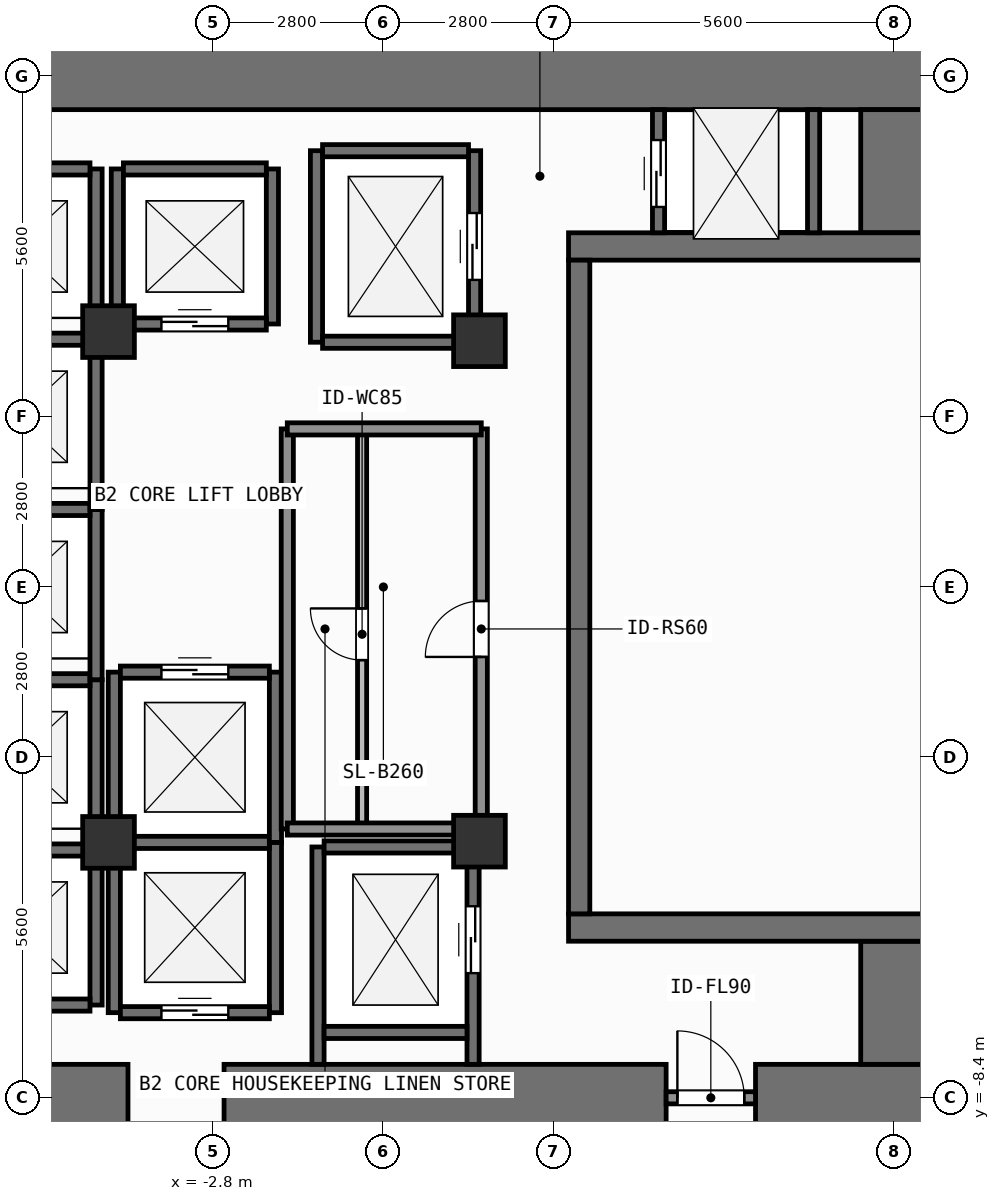
"""IFC4 building model, lengths in metres.
Left out: names, types, materials, properties, quantities, classifications, styles, units other than length and angle.
Written with IfcOpenShell. Run it as: python <this file> out.ifc"""

import sys

from ifc_helpers import new_model, si_unit, direction, frame, frame_2d, origin, origin_2d, place, context, subcontext, project, spatial, rectangle, extrude, element, fill, save


model = new_model("IFC4")
c1 = context("Model", 3, precision=1e-05, world=origin(), true_north=direction((0.0, 1.0)))
c2 = subcontext(c1, "Body", "Model", "MODEL_VIEW")
j1 = project(units=[si_unit("LENGTHUNIT", "METRE"), si_unit("PLANEANGLEUNIT", "RADIAN")], contexts=[c1])
p1 = place(None, origin())
s1 = spatial("IfcSite", under=j1, at=p1, CompositionType="ELEMENT")
p2 = place(p1, origin())
s2 = spatial("IfcBuilding", under=s1, at=p2, CompositionType="ELEMENT")
p3 = place(p2, frame((0.0, 0.0, -8.4)))
s3 = spatial("IfcBuildingStorey", under=s2, at=p3, CompositionType="ELEMENT", Elevation=-8.4)
p4 = place(p3, frame((-7.55, -8.4, 0.0), z_axis=(0.0, 0.0, 1.0), x_axis=(1.0, 0.0, 0.0)))
e1 = element("IfcWall", 1, at=p4, inside=s3, PredefinedType="SHEAR", context=c2, shape_type="SweptSolid", body=[
    extrude(rectangle(XDim=3.35, YDim=1.1, at=frame_2d((1.675, 0.0))), origin(), (0.0, 0.0, 1.0), 4.2),
])
p5 = place(p3, frame((-2.62, -8.4, 0.0), z_axis=(0.0, 0.0, 1.0), x_axis=(1.0, 0.0, 0.0)))
e2 = element("IfcWall", 2, at=p5, inside=s3, PredefinedType="SHEAR", context=c2, shape_type="SweptSolid", body=[
    extrude(rectangle(XDim=7.27, YDim=1.1, at=frame_2d((3.635, 0.0))), origin(), (0.0, 0.0, 1.0), 4.2),
])
p6 = place(p3, frame((6.12, -8.4, 0.0), z_axis=(0.0, 0.0, 1.0), x_axis=(1.0, 0.0, 0.0)))
e3 = element("IfcWall", 3, at=p6, inside=s3, PredefinedType="SHEAR", context=c2, shape_type="SweptSolid", body=[
    extrude(rectangle(XDim=2.83, YDim=1.1, at=frame_2d((1.415, 0.0))), origin(), (0.0, 0.0, 1.0), 4.2),
])
p7 = place(p3, frame((-7.55, 8.4, 0.0), z_axis=(0.0, 0.0, 1.0), x_axis=(1.0, 0.0, 0.0)))
e4 = element("IfcWall", 4, at=p7, inside=s3, PredefinedType="SHEAR", context=c2, shape_type="SweptSolid", body=[
    extrude(rectangle(XDim=16.5, YDim=1.1, at=frame_2d((8.25, 0.0))), origin(), (0.0, 0.0, 1.0), 4.2),
])
for number, where, z_axis, x_axis in (
    (5, (8.4, -7.85, 0.0), (0.0, 0.0, 1.0), (0.0, 1.0, 0.0)),
    (6, (8.4, 5.825, 0.0), (0.0, 0.0, 1.0), (0.0, 1.0, 0.0)),
):
    element("IfcWall", number, at=place(p3, frame(where, z_axis=z_axis, x_axis=x_axis)), inside=s3, PredefinedType="SHEAR", context=c2, shape_type="SweptSolid", body=[
        extrude(rectangle(XDim=2.025, YDim=1.1, at=frame_2d((1.013, 0.0))), origin(), (0.0, 0.0, 1.0), 4.2),
    ])
for number, where, z_axis, x_axis in (
    (7, (3.045, -5.6, 0.0), (0.0, 0.0, 1.0), (1.0, 0.0, 0.0)),
    (8, (3.045, 5.6, 0.0), (0.0, 0.0, 1.0), (1.0, 0.0, 0.0)),
):
    element("IfcWall", number, at=place(p3, frame(where, z_axis=z_axis, x_axis=x_axis)), inside=s3, PredefinedType="SHEAR", context=c2, shape_type="SweptSolid", body=[
        extrude(rectangle(XDim=5.905, YDim=0.45, at=frame_2d((2.953, 0.0))), origin(), (0.0, 0.0, 1.0), 4.2),
    ])
p8 = place(p3, frame((3.22, -5.375, 0.0), z_axis=(0.0, 0.0, 1.0), x_axis=(0.0, 1.0, 0.0)))
e9 = element("IfcWall", 9, at=p8, inside=s3, PredefinedType="SHEAR", context=c2, shape_type="SweptSolid", body=[
    extrude(rectangle(XDim=10.75, YDim=0.35, at=frame_2d((5.375, 0.0))), origin(), (0.0, 0.0, 1.0), 4.2),
])
for number, where, z_axis, x_axis in (
    (10, (-4.52, -4.2, 0.0), (0.0, 0.0, 1.0), (1.0, 0.0, 0.0)),
    (11, (1.58, -4.18, 0.0), (0.0, 0.0, 1.0), (1.0, 0.0, 0.0)),
    (12, (1.58, 4.05, 0.0), (0.0, 0.0, 1.0), (1.0, 0.0, 0.0)),
    (13, (-4.52, 4.2, 0.0), (0.0, 0.0, 1.0), (1.0, 0.0, 0.0)),
):
    element("IfcColumn", number, at=place(p3, frame(where, z_axis=z_axis, x_axis=x_axis)), inside=s3, PredefinedType="COLUMN", context=c2, shape_type="SweptSolid", body=[
        extrude(rectangle(XDim=0.85, YDim=0.85, at=origin_2d()), origin(), (0.0, 0.0, 1.0), 4.2),
    ])
p9 = place(p3, frame((-4.725, -6.875, 0.0), z_axis=(0.0, 0.0, 1.0), x_axis=(0.0, 1.0, 0.0)))
e14 = element("IfcWall", 14, at=p9, inside=s3, PredefinedType="SHEAR", context=c2, shape_type="SweptSolid", body=[
    extrude(rectangle(XDim=2.55, YDim=0.2, at=frame_2d((1.275, 0.0))), origin(), (0.0, 0.0, 1.0), 3.94),
])
for number, where, z_axis, x_axis in (
    (15, (-7.175, -6.875, 0.0), (0.0, 0.0, 1.0), (1.0, 0.0, 0.0)),
    (16, (-7.175, -4.325, 0.0), (0.0, 0.0, 1.0), (1.0, 0.0, 0.0)),
):
    element("IfcWall", number, at=place(p3, frame(where, z_axis=z_axis, x_axis=x_axis)), inside=s3, PredefinedType="SHEAR", context=c2, shape_type="SweptSolid", body=[
        extrude(rectangle(XDim=2.35, YDim=0.2, at=frame_2d((1.175, 0.0))), origin(), (0.0, 0.0, 1.0), 3.94),
    ])
p10 = place(p3, frame((-4.725, -4.325, 0.0), z_axis=(0.0, 0.0, 1.0), x_axis=(0.0, 1.0, 0.0)))
e17 = element("IfcWall", 17, at=p10, inside=s3, PredefinedType="SHEAR", context=c2, shape_type="SweptSolid", body=[
    extrude(rectangle(XDim=2.8, YDim=0.2, at=frame_2d((1.4, 0.0))), origin(), (0.0, 0.0, 1.0), 3.94),
])
p11 = place(p3, frame((-7.175, -1.525, 0.0), z_axis=(0.0, 0.0, 1.0), x_axis=(1.0, 0.0, 0.0)))
e18 = element("IfcWall", 18, at=p11, inside=s3, PredefinedType="SHEAR", context=c2, shape_type="SweptSolid", body=[
    extrude(rectangle(XDim=2.35, YDim=0.2, at=frame_2d((1.175, 0.0))), origin(), (0.0, 0.0, 1.0), 3.94),
])
p12 = place(p3, frame((-4.725, -1.525, 0.0), z_axis=(0.0, 0.0, 1.0), x_axis=(0.0, 1.0, 0.0)))
e19 = element("IfcWall", 19, at=p12, inside=s3, PredefinedType="SHEAR", context=c2, shape_type="SweptSolid", body=[
    extrude(rectangle(XDim=2.8, YDim=0.2, at=frame_2d((1.4, 0.0))), origin(), (0.0, 0.0, 1.0), 3.94),
])
p13 = place(p3, frame((-7.175, 1.275, 0.0), z_axis=(0.0, 0.0, 1.0), x_axis=(1.0, 0.0, 0.0)))
e20 = element("IfcWall", 20, at=p13, inside=s3, PredefinedType="SHEAR", context=c2, shape_type="SweptSolid", body=[
    extrude(rectangle(XDim=2.35, YDim=0.2, at=frame_2d((1.175, 0.0))), origin(), (0.0, 0.0, 1.0), 3.94),
])
p14 = place(p3, frame((-4.725, 1.275, 0.0), z_axis=(0.0, 0.0, 1.0), x_axis=(0.0, 1.0, 0.0)))
e21 = element("IfcWall", 21, at=p14, inside=s3, PredefinedType="SHEAR", context=c2, shape_type="SweptSolid", body=[
    extrude(rectangle(XDim=2.8, YDim=0.2, at=frame_2d((1.4, 0.0))), origin(), (0.0, 0.0, 1.0), 3.94),
])
p15 = place(p3, frame((-7.175, 4.075, 0.0), z_axis=(0.0, 0.0, 1.0), x_axis=(1.0, 0.0, 0.0)))
e22 = element("IfcWall", 22, at=p15, inside=s3, PredefinedType="SHEAR", context=c2, shape_type="SweptSolid", body=[
    extrude(rectangle(XDim=2.35, YDim=0.2, at=frame_2d((1.175, 0.0))), origin(), (0.0, 0.0, 1.0), 3.94),
])
p16 = place(p3, frame((-4.725, 4.075, 0.0), z_axis=(0.0, 0.0, 1.0), x_axis=(0.0, 1.0, 0.0)))
e23 = element("IfcWall", 23, at=p16, inside=s3, PredefinedType="SHEAR", context=c2, shape_type="SweptSolid", body=[
    extrude(rectangle(XDim=2.8, YDim=0.2, at=frame_2d((1.4, 0.0))), origin(), (0.0, 0.0, 1.0), 3.94),
])
p17 = place(p3, frame((-7.175, 6.875, 0.0), z_axis=(0.0, 0.0, 1.0), x_axis=(1.0, 0.0, 0.0)))
e24 = element("IfcWall", 24, at=p17, inside=s3, PredefinedType="SHEAR", context=c2, shape_type="SweptSolid", body=[
    extrude(rectangle(XDim=2.35, YDim=0.2, at=frame_2d((1.175, 0.0))), origin(), (0.0, 0.0, 1.0), 3.94),
])
for number, where, z_axis, x_axis in (
    (25, (-4.375, 4.325, 0.0), (0.0, 0.0, 1.0), (0.0, 1.0, 0.0)),
    (26, (-1.825, 4.325, 0.0), (0.0, 0.0, 1.0), (0.0, 1.0, 0.0)),
):
    element("IfcWall", number, at=place(p3, frame(where, z_axis=z_axis, x_axis=x_axis)), inside=s3, PredefinedType="SHEAR", context=c2, shape_type="SweptSolid", body=[
        extrude(rectangle(XDim=2.55, YDim=0.2, at=frame_2d((1.275, 0.0))), origin(), (0.0, 0.0, 1.0), 3.94),
    ])
p18 = place(p3, frame((-4.275, 4.325, 0.0), z_axis=(0.0, 0.0, 1.0), x_axis=(1.0, 0.0, 0.0)))
e27 = element("IfcWall", 27, at=p18, inside=s3, PredefinedType="SHEAR", context=c2, shape_type="SweptSolid", body=[
    extrude(rectangle(XDim=2.35, YDim=0.2, at=frame_2d((1.175, 0.0))), origin(), (0.0, 0.0, 1.0), 3.94),
])
p19 = place(p18, frame((0.625, 0.0, 0.0)))
e28 = element("IfcOpeningElement", 28, at=p19, cuts=e27, PredefinedType="OPENING", context=c2, shape_type="SweptSolid", body=[
    extrude(rectangle(XDim=1.1, YDim=2.2, at=frame_2d((0.55, 1.1))), frame((0.0, 0.11, 0.0), z_axis=(0.0, -1.0, 0.0), x_axis=(1.0, 0.0, 0.0)), (0.0, 0.0, 1.0), 0.22),
])
p20 = place(p3, frame((-4.275, 6.875, 0.0), z_axis=(0.0, 0.0, 1.0), x_axis=(1.0, 0.0, 0.0)))
e29 = element("IfcWall", 29, at=p20, inside=s3, PredefinedType="SHEAR", context=c2, shape_type="SweptSolid", body=[
    extrude(rectangle(XDim=2.35, YDim=0.2, at=frame_2d((1.175, 0.0))), origin(), (0.0, 0.0, 1.0), 3.94),
])
for number, where, z_axis, x_axis in (
    (30, (-4.425, -7.0, 0.0), (0.0, 0.0, 1.0), (0.0, 1.0, 0.0)),
    (31, (-1.775, -7.0, 0.0), (0.0, 0.0, 1.0), (0.0, 1.0, 0.0)),
):
    element("IfcWall", number, at=place(p3, frame(where, z_axis=z_axis, x_axis=x_axis)), inside=s3, PredefinedType="SHEAR", context=c2, shape_type="SweptSolid", body=[
        extrude(rectangle(XDim=2.8, YDim=0.2, at=frame_2d((1.4, 0.0))), origin(), (0.0, 0.0, 1.0), 3.94),
    ])
p21 = place(p3, frame((-4.325, -7.0, 0.0), z_axis=(0.0, 0.0, 1.0), x_axis=(1.0, 0.0, 0.0)))
e32 = element("IfcWall", 32, at=p21, inside=s3, PredefinedType="SHEAR", context=c2, shape_type="SweptSolid", body=[
    extrude(rectangle(XDim=2.45, YDim=0.2, at=frame_2d((1.225, 0.0))), origin(), (0.0, 0.0, 1.0), 3.94),
])
p22 = place(p21, frame((0.675, 0.0, 0.0)))
e33 = element("IfcOpeningElement", 33, at=p22, cuts=e32, PredefinedType="OPENING", context=c2, shape_type="SweptSolid", body=[
    extrude(rectangle(XDim=1.1, YDim=2.2, at=frame_2d((0.55, 1.1))), frame((0.0, 0.11, 0.0), z_axis=(0.0, -1.0, 0.0), x_axis=(1.0, 0.0, 0.0)), (0.0, 0.0, 1.0), 0.22),
])
p23 = place(p3, frame((-4.325, -4.2, 0.0), z_axis=(0.0, 0.0, 1.0), x_axis=(1.0, 0.0, 0.0)))
e34 = element("IfcWall", 34, at=p23, inside=s3, PredefinedType="SHEAR", context=c2, shape_type="SweptSolid", body=[
    extrude(rectangle(XDim=2.45, YDim=0.2, at=frame_2d((1.225, 0.0))), origin(), (0.0, 0.0, 1.0), 3.94),
])
for number, where, z_axis, x_axis in (
    (35, (-4.425, -4.2, 0.0), (0.0, 0.0, 1.0), (0.0, 1.0, 0.0)),
    (36, (-1.775, -4.2, 0.0), (0.0, 0.0, 1.0), (0.0, 1.0, 0.0)),
):
    element("IfcWall", number, at=place(p3, frame(where, z_axis=z_axis, x_axis=x_axis)), inside=s3, PredefinedType="SHEAR", context=c2, shape_type="SweptSolid", body=[
        extrude(rectangle(XDim=2.8, YDim=0.2, at=frame_2d((1.4, 0.0))), origin(), (0.0, 0.0, 1.0), 3.94),
    ])
p24 = place(p3, frame((-4.325, -1.4, 0.0), z_axis=(0.0, 0.0, 1.0), x_axis=(1.0, 0.0, 0.0)))
e37 = element("IfcWall", 37, at=p24, inside=s3, PredefinedType="SHEAR", context=c2, shape_type="SweptSolid", body=[
    extrude(rectangle(XDim=2.45, YDim=0.2, at=frame_2d((1.225, 0.0))), origin(), (0.0, 0.0, 1.0), 3.94),
])
p25 = place(p24, frame((0.675, 0.0, 0.0)))
e38 = element("IfcOpeningElement", 38, at=p25, cuts=e37, PredefinedType="OPENING", context=c2, shape_type="SweptSolid", body=[
    extrude(rectangle(XDim=1.1, YDim=2.2, at=frame_2d((0.55, 1.1))), frame((0.0, 0.11, 0.0), z_axis=(0.0, -1.0, 0.0), x_axis=(1.0, 0.0, 0.0)), (0.0, 0.0, 1.0), 0.22),
])
p26 = place(p3, frame((-1.1, 4.025, 0.0), z_axis=(0.0, 0.0, 1.0), x_axis=(0.0, 1.0, 0.0)))
e39 = element("IfcWall", 39, at=p26, inside=s3, PredefinedType="SHEAR", context=c2, shape_type="SweptSolid", body=[
    extrude(rectangle(XDim=3.15, YDim=0.2, at=frame_2d((1.575, 0.0))), origin(), (0.0, 0.0, 1.0), 3.94),
])
p27 = place(p3, frame((1.5, 4.025, 0.0), z_axis=(0.0, 0.0, 1.0), x_axis=(0.0, 1.0, 0.0)))
e40 = element("IfcWall", 40, at=p27, inside=s3, PredefinedType="SHEAR", context=c2, shape_type="SweptSolid", body=[
    extrude(rectangle(XDim=3.15, YDim=0.2, at=frame_2d((1.575, 0.0))), origin(), (0.0, 0.0, 1.0), 3.94),
])
p28 = place(p27, frame((1.025, 0.0, 0.0)))
e41 = element("IfcOpeningElement", 41, at=p28, cuts=e40, PredefinedType="OPENING", context=c2, shape_type="SweptSolid", body=[
    extrude(rectangle(XDim=1.1, YDim=2.2, at=frame_2d((0.55, 1.1))), frame((0.0, 0.11, 0.0), z_axis=(0.0, -1.0, 0.0), x_axis=(1.0, 0.0, 0.0)), (0.0, 0.0, 1.0), 0.22),
])
for number, where, z_axis, x_axis in (
    (42, (-1.0, 4.025, 0.0), (0.0, 0.0, 1.0), (1.0, 0.0, 0.0)),
    (43, (-1.0, 7.175, 0.0), (0.0, 0.0, 1.0), (1.0, 0.0, 0.0)),
):
    element("IfcWall", number, at=place(p3, frame(where, z_axis=z_axis, x_axis=x_axis)), inside=s3, PredefinedType="SHEAR", context=c2, shape_type="SweptSolid", body=[
        extrude(rectangle(XDim=2.4, YDim=0.2, at=frame_2d((1.2, 0.0))), origin(), (0.0, 0.0, 1.0), 3.94),
    ])
p29 = place(p3, frame((-1.075, -7.85, 0.0), z_axis=(0.0, 0.0, 1.0), x_axis=(0.0, 1.0, 0.0)))
e44 = element("IfcWall", 44, at=p29, inside=s3, PredefinedType="SHEAR", context=c2, shape_type="SweptSolid", body=[
    extrude(rectangle(XDim=3.575, YDim=0.2, at=frame_2d((1.788, 0.0))), origin(), (0.0, 0.0, 1.0), 3.94),
])
p30 = place(p3, frame((1.475, -7.85, 0.0), z_axis=(0.0, 0.0, 1.0), x_axis=(0.0, 1.0, 0.0)))
e45 = element("IfcWall", 45, at=p30, inside=s3, PredefinedType="SHEAR", context=c2, shape_type="SweptSolid", body=[
    extrude(rectangle(XDim=3.575, YDim=0.2, at=frame_2d((1.788, 0.0))), origin(), (0.0, 0.0, 1.0), 3.94),
])
p31 = place(p30, frame((1.5, 0.0, 0.0)))
e46 = element("IfcOpeningElement", 46, at=p31, cuts=e45, PredefinedType="OPENING", context=c2, shape_type="SweptSolid", body=[
    extrude(rectangle(XDim=1.1, YDim=2.2, at=frame_2d((0.55, 1.1))), frame((0.0, 0.11, 0.0), z_axis=(0.0, -1.0, 0.0), x_axis=(1.0, 0.0, 0.0)), (0.0, 0.0, 1.0), 0.22),
])
for number, where, z_axis, x_axis in (
    (47, (-0.975, -7.325, 0.0), (0.0, 0.0, 1.0), (1.0, 0.0, 0.0)),
    (48, (-0.975, -4.275, 0.0), (0.0, 0.0, 1.0), (1.0, 0.0, 0.0)),
):
    element("IfcWall", number, at=place(p3, frame(where, z_axis=z_axis, x_axis=x_axis)), inside=s3, PredefinedType="SHEAR", context=c2, shape_type="SweptSolid", body=[
        extrude(rectangle(XDim=2.35, YDim=0.2, at=frame_2d((1.175, 0.0))), origin(), (0.0, 0.0, 1.0), 3.94),
    ])
p32 = place(p3, frame((4.525, 5.825, 0.0), z_axis=(0.0, 0.0, 1.0), x_axis=(0.0, 1.0, 0.0)))
e49 = element("IfcWall", 49, at=p32, inside=s3, PredefinedType="SHEAR", context=c2, shape_type="SweptSolid", body=[
    extrude(rectangle(XDim=2.025, YDim=0.2, at=frame_2d((1.013, 0.0))), origin(), (0.0, 0.0, 1.0), 3.94),
])
p33 = place(p32, frame((0.425, 0.0, 0.0)))
e50 = element("IfcOpeningElement", 50, at=p33, cuts=e49, PredefinedType="OPENING", context=c2, shape_type="SweptSolid", body=[
    extrude(rectangle(XDim=1.1, YDim=2.2, at=frame_2d((0.55, 1.1))), frame((0.0, 0.11, 0.0), z_axis=(0.0, -1.0, 0.0), x_axis=(1.0, 0.0, 0.0)), (0.0, 0.0, 1.0), 0.22),
])
p34 = place(p3, frame((7.075, 5.825, 0.0), z_axis=(0.0, 0.0, 1.0), x_axis=(0.0, 1.0, 0.0)))
e51 = element("IfcWall", 51, at=p34, inside=s3, PredefinedType="SHEAR", context=c2, shape_type="SweptSolid", body=[
    extrude(rectangle(XDim=2.025, YDim=0.2, at=frame_2d((1.013, 0.0))), origin(), (0.0, 0.0, 1.0), 3.94),
])
p35 = place(p3, frame((4.65, -8.4, 0.0), z_axis=(0.0, 0.0, 1.0), x_axis=(1.0, 0.0, 0.0)))
e52 = element("IfcWall", 52, at=p35, inside=s3, PredefinedType="SOLIDWALL", context=c2, shape_type="SweptSolid", body=[
    extrude(rectangle(XDim=1.47, YDim=0.2, at=frame_2d((0.735, 0.0))), origin(), (0.0, 0.0, 1.0), 2.98),
])
p36 = place(p35, frame((0.185, 0.0, 0.0)))
e53 = element("IfcOpeningElement", 53, at=p36, cuts=e52, PredefinedType="OPENING", context=c2, shape_type="SweptSolid", body=[
    extrude(rectangle(XDim=1.1, YDim=2.15, at=frame_2d((0.55, 1.075))), frame((0.0, 0.11, 0.0), z_axis=(0.0, -1.0, 0.0), x_axis=(1.0, 0.0, 0.0)), (0.0, 0.0, 1.0), 0.22),
])
p37 = place(p3, frame((-0.35, -3.98, 0.0), z_axis=(0.0, 0.0, 1.0), x_axis=(0.0, 1.0, 0.0)))
e54 = element("IfcWall", 54, at=p37, inside=s3, PredefinedType="PARTITIONING", context=c2, shape_type="SweptSolid", body=[
    extrude(rectangle(XDim=6.58, YDim=0.15, at=frame_2d((3.29, 0.0))), origin(), (0.0, 0.0, 1.0), 3.94),
])
p38 = place(p37, frame((2.778, 0.0, 0.0)))
e55 = element("IfcOpeningElement", 55, at=p38, cuts=e54, PredefinedType="OPENING", context=c2, shape_type="SweptSolid", body=[
    extrude(rectangle(XDim=0.85, YDim=2.1, at=frame_2d((0.425, 1.05))), frame((0.0, 0.085, 0.0), z_axis=(0.0, -1.0, 0.0), x_axis=(1.0, 0.0, 0.0)), (0.0, 0.0, 1.0), 0.17),
])
p39 = place(p3, frame((1.61, -3.98, 0.0), z_axis=(0.0, 0.0, 1.0), x_axis=(0.0, 1.0, 0.0)))
e56 = element("IfcWall", 56, at=p39, inside=s3, PredefinedType="SOLIDWALL", context=c2, shape_type="SweptSolid", body=[
    extrude(rectangle(XDim=6.58, YDim=0.2, at=frame_2d((3.29, 0.0))), origin(), (0.0, 0.0, 1.0), 3.94),
])
p40 = place(p39, frame((2.83, 0.0, 0.0)))
e57 = element("IfcOpeningElement", 57, at=p40, cuts=e56, PredefinedType="OPENING", context=c2, shape_type="SweptSolid", body=[
    extrude(rectangle(XDim=0.92, YDim=2.1, at=frame_2d((0.46, 1.05))), frame((0.0, 0.11, 0.0), z_axis=(0.0, -1.0, 0.0), x_axis=(1.0, 0.0, 0.0)), (0.0, 0.0, 1.0), 0.22),
])
p41 = place(p3, frame((-1.58, -3.98, 0.0), z_axis=(0.0, 0.0, 1.0), x_axis=(0.0, 1.0, 0.0)))
e58 = element("IfcWall", 58, at=p41, inside=s3, PredefinedType="SOLIDWALL", context=c2, shape_type="SweptSolid", body=[
    extrude(rectangle(XDim=6.58, YDim=0.2, at=frame_2d((3.29, 0.0))), origin(), (0.0, 0.0, 1.0), 3.94),
])
for number, where, z_axis, x_axis in (
    (59, (-1.58, -3.98, 0.0), (0.0, 0.0, 1.0), (1.0, 0.0, 0.0)),
    (60, (-1.58, 2.6, 0.0), (0.0, 0.0, 1.0), (1.0, 0.0, 0.0)),
):
    element("IfcWall", number, at=place(p3, frame(where, z_axis=z_axis, x_axis=x_axis)), inside=s3, PredefinedType="SOLIDWALL", context=c2, shape_type="SweptSolid", body=[
        extrude(rectangle(XDim=3.19, YDim=0.2, at=frame_2d((1.595, 0.0))), origin(), (0.0, 0.0, 1.0), 3.94),
    ])
p42 = place(p19, origin())
e61 = element("IfcDoor", 61, at=p42, inside=s3, OperationType="SLIDING_TO_LEFT", PredefinedType="DOOR", context=c2, shape_type="SweptSolid", body=[
    extrude(rectangle(XDim=1.1, YDim=2.2, at=frame_2d((0.55, 1.1))), frame((0.0, 0.025, 0.0), z_axis=(0.0, -1.0, 0.0), x_axis=(1.0, 0.0, 0.0)), (0.0, 0.0, 1.0), 0.05),
])
fill(e28, e61)
p43 = place(p22, origin())
e62 = element("IfcDoor", 62, at=p43, inside=s3, OperationType="SLIDING_TO_LEFT", PredefinedType="DOOR", context=c2, shape_type="SweptSolid", body=[
    extrude(rectangle(XDim=1.1, YDim=2.2, at=frame_2d((0.55, 1.1))), frame((0.0, 0.025, 0.0), z_axis=(0.0, -1.0, 0.0), x_axis=(1.0, 0.0, 0.0)), (0.0, 0.0, 1.0), 0.05),
])
fill(e33, e62)
p44 = place(p25, origin())
e63 = element("IfcDoor", 63, at=p44, inside=s3, OperationType="SLIDING_TO_LEFT", PredefinedType="DOOR", context=c2, shape_type="SweptSolid", body=[
    extrude(rectangle(XDim=1.1, YDim=2.2, at=frame_2d((0.55, 1.1))), frame((0.0, 0.025, 0.0), z_axis=(0.0, -1.0, 0.0), x_axis=(1.0, 0.0, 0.0)), (0.0, 0.0, 1.0), 0.05),
])
fill(e38, e63)
p45 = place(p28, origin())
e64 = element("IfcDoor", 64, at=p45, inside=s3, OperationType="SLIDING_TO_LEFT", PredefinedType="DOOR", context=c2, shape_type="SweptSolid", body=[
    extrude(rectangle(XDim=1.1, YDim=2.2, at=frame_2d((0.55, 1.1))), frame((0.0, 0.025, 0.0), z_axis=(0.0, -1.0, 0.0), x_axis=(1.0, 0.0, 0.0)), (0.0, 0.0, 1.0), 0.05),
])
fill(e41, e64)
p46 = place(p31, origin())
e65 = element("IfcDoor", 65, at=p46, inside=s3, OperationType="SLIDING_TO_LEFT", PredefinedType="DOOR", context=c2, shape_type="SweptSolid", body=[
    extrude(rectangle(XDim=1.1, YDim=2.2, at=frame_2d((0.55, 1.1))), frame((0.0, 0.025, 0.0), z_axis=(0.0, -1.0, 0.0), x_axis=(1.0, 0.0, 0.0)), (0.0, 0.0, 1.0), 0.05),
])
fill(e46, e65)
p47 = place(p33, origin())
e66 = element("IfcDoor", 66, at=p47, inside=s3, OperationType="SLIDING_TO_LEFT", PredefinedType="DOOR", context=c2, shape_type="SweptSolid", body=[
    extrude(rectangle(XDim=1.1, YDim=2.2, at=frame_2d((0.55, 1.1))), frame((0.0, 0.025, 0.0), z_axis=(0.0, -1.0, 0.0), x_axis=(1.0, 0.0, 0.0)), (0.0, 0.0, 1.0), 0.05),
])
fill(e50, e66)
p48 = place(p36, origin())
e67 = element("IfcDoor", 67, at=p48, inside=s3, OperationType="SINGLE_SWING_LEFT", PredefinedType="DOOR", context=c2, shape_type="SweptSolid", body=[
    extrude(rectangle(XDim=1.1, YDim=2.15, at=frame_2d((0.55, 1.075))), frame((0.0, 0.025, 0.0), z_axis=(0.0, -1.0, 0.0), x_axis=(1.0, 0.0, 0.0)), (0.0, 0.0, 1.0), 0.05),
])
fill(e53, e67)
p49 = place(p38, origin())
e68 = element("IfcDoor", 68, at=p49, inside=s3, OperationType="SINGLE_SWING_RIGHT", PredefinedType="DOOR", context=c2, shape_type="SweptSolid", body=[
    extrude(rectangle(XDim=0.85, YDim=2.1, at=frame_2d((0.425, 1.05))), frame((0.0, 0.025, 0.0), z_axis=(0.0, -1.0, 0.0), x_axis=(1.0, 0.0, 0.0)), (0.0, 0.0, 1.0), 0.05),
])
fill(e55, e68)
p50 = place(p40, origin())
e69 = element("IfcDoor", 69, at=p50, inside=s3, OperationType="SINGLE_SWING_LEFT", PredefinedType="DOOR", context=c2, shape_type="SweptSolid", body=[
    extrude(rectangle(XDim=0.92, YDim=2.1, at=frame_2d((0.46, 1.05))), frame((0.0, 0.025, 0.0), z_axis=(0.0, -1.0, 0.0), x_axis=(1.0, 0.0, 0.0)), (0.0, 0.0, 1.0), 0.05),
])
fill(e57, e69)
save(model, sys.argv[1])
